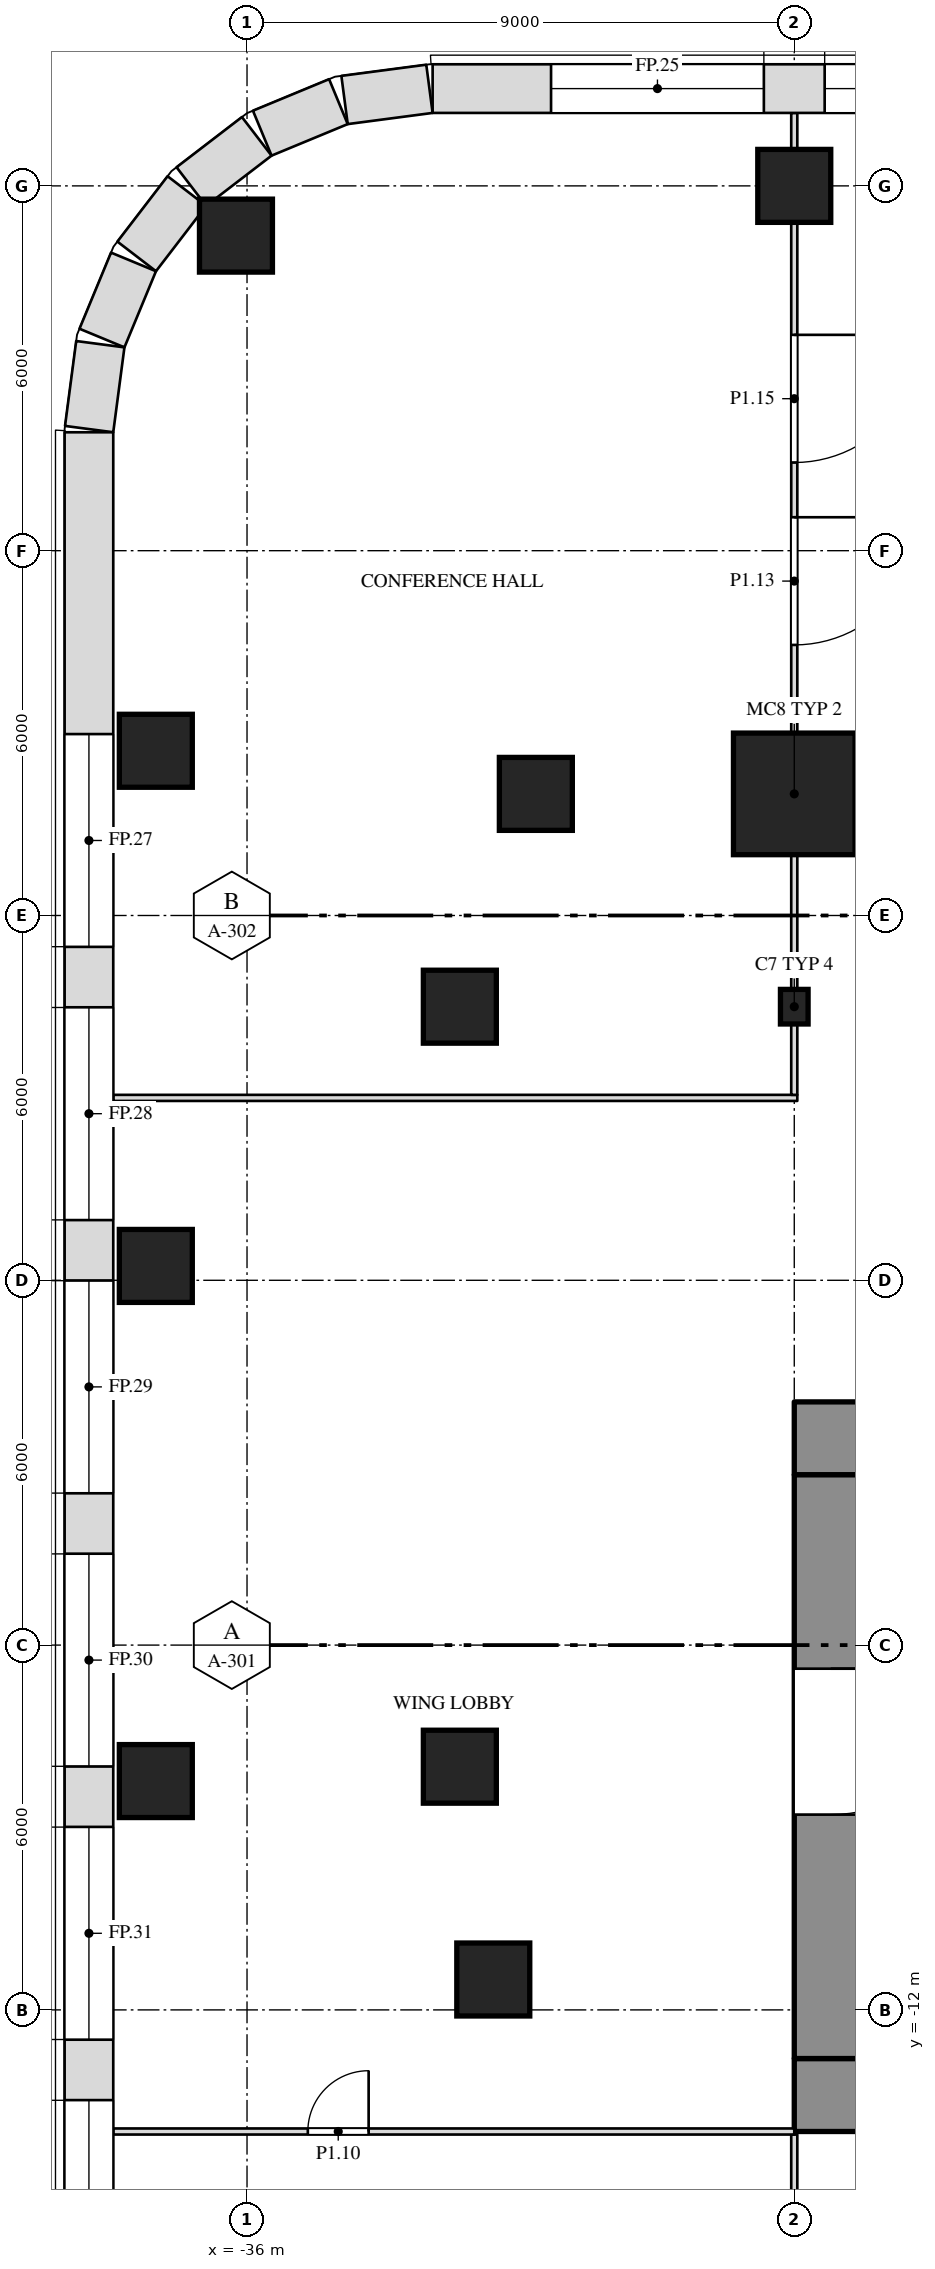
"""IFC4 building model, lengths in metres.
Left out: names, types, materials, properties, quantities, classifications, styles, units other than length and angle.
Written with IfcOpenShell. Run it as: python <this file> out.ifc"""

import sys

from ifc_helpers import new_model, si_unit, direction, frame, frame_2d, origin, origin_2d, place, context, subcontext, project, spatial, rectangle, i_section, extrude, element, fill, save


model = new_model("IFC4")
c1 = context("Model", 3, precision=1e-05, world=origin(), true_north=direction((0.0, 1.0)))
c2 = subcontext(c1, "Body", "Model", "MODEL_VIEW")
j1 = project(units=[si_unit("LENGTHUNIT", "METRE"), si_unit("PLANEANGLEUNIT", "RADIAN")], contexts=[c1])
p1 = place(None, origin())
s1 = spatial("IfcSite", under=j1, at=p1, CompositionType="ELEMENT")
p2 = place(p1, origin())
s2 = spatial("IfcBuilding", under=s1, at=p2, CompositionType="ELEMENT")
p3 = place(p2, frame((0.0, 0.0, 9.0)))
s3 = spatial("IfcBuildingStorey", under=s2, at=p3, CompositionType="ELEMENT", Elevation=9.0)
for number, where, z_axis, x_axis in (
    (1, (-31.95, -11.5, 0.0), (0.0, 0.0, 1.0), (1.0, 0.0, 0.0)),
    (2, (-37.5, -8.236, 0.0), (0.0, 0.0, 1.0), (1.0, 0.0, 0.0)),
    (3, (-32.5, -8.0, 0.0), (0.0, 0.0, 1.0), (1.0, 0.0, 0.0)),
    (4, (-37.5, 0.236, 0.0), (0.0, 0.0, 1.0), (1.0, 0.0, 0.0)),
    (5, (-32.5, 4.5, 0.0), (0.0, 0.0, 1.0), (1.0, 0.0, 0.0)),
):
    element("IfcColumn", number, at=place(p3, frame(where, z_axis=z_axis, x_axis=x_axis)), inside=s3, PredefinedType="COLUMN", context=c2, shape_type="SweptSolid", body=[
        extrude(rectangle(XDim=1.2, YDim=1.2, at=origin_2d()), origin(), (0.0, 0.0, 1.0), 6.0),
    ])
p4 = place(p3, frame((-27.0, 4.5, 0.0), z_axis=(0.0, 0.0, 1.0), x_axis=(1.0, 0.0, 0.0)))
e6 = element("IfcColumn", 6, at=p4, inside=s3, PredefinedType="COLUMN", context=c2, shape_type="SweptSolid", body=[
    extrude(i_section(OverallWidth=0.455, OverallDepth=0.569, WebThickness=0.078, FlangeThickness=0.125, at=origin_2d()), origin(), (0.0, 0.0, 1.0), 6.0),
])
p5 = place(p3, frame((-31.25, 8.0, 0.0), z_axis=(0.0, 0.0, 1.0), x_axis=(1.0, 0.0, 0.0)))
e7 = element("IfcColumn", 7, at=p5, inside=s3, PredefinedType="COLUMN", context=c2, shape_type="SweptSolid", body=[
    extrude(rectangle(XDim=1.2, YDim=1.2, at=origin_2d()), origin(), (0.0, 0.0, 1.0), 6.0),
])
p6 = place(p3, frame((-27.0, 8.0, 0.0), z_axis=(0.0, 0.0, 1.0), x_axis=(1.0, 0.0, 0.0)))
e8 = element("IfcColumn", 8, at=p6, inside=s3, PredefinedType="COLUMN", context=c2, shape_type="SweptSolid", body=[
    extrude(rectangle(XDim=2.0, YDim=2.0, at=origin_2d()), origin(), (0.0, 0.0, 1.0), 6.0),
])
for number, where, z_axis, x_axis in (
    (9, (-37.5, 8.709, 0.0), (0.0, 0.0, 1.0), (1.0, 0.0, 0.0)),
    (10, (-36.182, 17.182, 0.0), (0.0, 0.0, 1.0), (1.0, 0.0, 0.0)),
    (11, (-27.0, 18.0, 0.0), (0.0, 0.0, 1.0), (1.0, 0.0, 0.0)),
):
    element("IfcColumn", number, at=place(p3, frame(where, z_axis=z_axis, x_axis=x_axis)), inside=s3, PredefinedType="COLUMN", context=c2, shape_type="SweptSolid", body=[
        extrude(rectangle(XDim=1.2, YDim=1.2, at=origin_2d()), origin(), (0.0, 0.0, 1.0), 6.0),
    ])
p7 = place(p3, frame((-27.0, -2.6, 0.0), z_axis=(0.0, 0.0, 1.0), x_axis=(1.0, 0.0, 0.0)))
e12 = element("IfcWall", 12, at=p7, inside=s3, PredefinedType="SHEAR", context=c2, shape_type="SweptSolid", body=[
    extrude(rectangle(XDim=54.0, YDim=1.2, at=frame_2d((27.0, 0.0))), origin(), (0.0, 0.0, 1.0), 5.7),
])
p8 = place(p3, frame((-27.0, -13.4, 0.0), z_axis=(0.0, 0.0, 1.0), x_axis=(1.0, 0.0, 0.0)))
e13 = element("IfcWall", 13, at=p8, inside=s3, PredefinedType="SHEAR", context=c2, shape_type="SweptSolid", body=[
    extrude(rectangle(XDim=54.0, YDim=1.2, at=frame_2d((27.0, 0.0))), origin(), (0.0, 0.0, 1.0), 5.7),
])
p9 = place(p8, frame((16.45, 0.0, 0.0)))
e14 = element("IfcOpeningElement", 14, at=p9, cuts=e13, PredefinedType="OPENING", context=c2, shape_type="SweptSolid", body=[
    extrude(rectangle(XDim=1.0, YDim=2.1, at=frame_2d((0.5, 1.05))), frame((0.0, 0.612, 0.0), z_axis=(0.0, -1.0, 0.0), x_axis=(1.0, 0.0, 0.0)), (0.0, 0.0, 1.0), 1.224),
])
p10 = place(p8, frame((36.55, 0.0, 0.0)))
e15 = element("IfcOpeningElement", 15, at=p10, cuts=e13, PredefinedType="OPENING", context=c2, shape_type="SweptSolid", body=[
    extrude(rectangle(XDim=1.0, YDim=2.1, at=frame_2d((0.5, 1.05))), frame((0.0, 0.612, 0.0), z_axis=(0.0, -1.0, 0.0), x_axis=(1.0, 0.0, 0.0)), (0.0, 0.0, 1.0), 1.224),
])
p11 = place(p3, frame((-26.4, -12.8, 0.0), z_axis=(0.0, 0.0, 1.0), x_axis=(0.0, 1.0, 0.0)))
e16 = element("IfcWall", 16, at=p11, inside=s3, PredefinedType="SHEAR", context=c2, shape_type="SweptSolid", body=[
    extrude(rectangle(XDim=9.6, YDim=1.2, at=frame_2d((4.8, 0.0))), origin(), (0.0, 0.0, 1.0), 5.7),
])
p12 = place(p11, frame((4.012, 0.0, 0.0)))
e17 = element("IfcOpeningElement", 17, at=p12, cuts=e16, PredefinedType="OPENING", context=c2, shape_type="SweptSolid", body=[
    extrude(rectangle(XDim=2.4, YDim=2.1, at=frame_2d((1.2, 1.05))), frame((0.0, 0.612, 0.0), z_axis=(0.0, -1.0, 0.0), x_axis=(1.0, 0.0, 0.0)), (0.0, 0.0, 1.0), 1.224),
])
p13 = place(p3, frame((-27.0, -16.9, 0.0), z_axis=(0.0, 0.0, 1.0), x_axis=(0.0, 1.0, 0.0)))
e18 = element("IfcWall", 18, at=p13, inside=s3, PredefinedType="PARTITIONING", context=c2, shape_type="SweptSolid", body=[
    extrude(rectangle(XDim=2.85, YDim=0.1, at=frame_2d((1.425, 0.0))), origin(), (0.0, 0.0, 1.0), 5.088),
])
p14 = place(p3, frame((-38.2, -14.0, 0.0), z_axis=(0.0, 0.0, 1.0), x_axis=(1.0, 0.0, 0.0)))
e19 = element("IfcWall", 19, at=p14, inside=s3, PredefinedType="PARTITIONING", context=c2, shape_type="SweptSolid", body=[
    extrude(rectangle(XDim=11.2, YDim=0.1, at=frame_2d((5.6, 0.0))), origin(), (0.0, 0.0, 1.0), 5.7),
])
p15 = place(p14, frame((3.2, 0.0, 0.0)))
e20 = element("IfcOpeningElement", 20, at=p15, cuts=e19, PredefinedType="OPENING", context=c2, shape_type="SweptSolid", body=[
    extrude(rectangle(XDim=1.0, YDim=2.1, at=frame_2d((0.5, 1.05))), frame((0.0, 0.062, 0.0), z_axis=(0.0, -1.0, 0.0), x_axis=(1.0, 0.0, 0.0)), (0.0, 0.0, 1.0), 0.124),
])
p16 = place(p3, frame((-38.2, 3.0, 0.0), z_axis=(0.0, 0.0, 1.0), x_axis=(1.0, 0.0, 0.0)))
e21 = element("IfcWall", 21, at=p16, inside=s3, PredefinedType="PARTITIONING", context=c2, shape_type="SweptSolid", body=[
    extrude(rectangle(XDim=11.25, YDim=0.1, at=frame_2d((5.625, 0.0))), origin(), (0.0, 0.0, 1.0), 5.7),
])
p17 = place(p3, frame((-27.0, 3.05, 0.0), z_axis=(0.0, 0.0, 1.0), x_axis=(0.0, 1.0, 0.0)))
e22 = element("IfcWall", 22, at=p17, inside=s3, PredefinedType="PARTITIONING", context=c2, shape_type="SweptSolid", body=[
    extrude(rectangle(XDim=1.166, YDim=0.1, at=frame_2d((0.583, 0.0))), origin(), (0.0, 0.0, 1.0), 5.088),
])
p18 = place(p3, frame((-27.0, 4.784, 0.0), z_axis=(0.0, 0.0, 1.0), x_axis=(0.0, 1.0, 0.0)))
e23 = element("IfcWall", 23, at=p18, inside=s3, PredefinedType="PARTITIONING", context=c2, shape_type="SweptSolid", body=[
    extrude(rectangle(XDim=2.216, YDim=0.1, at=frame_2d((1.108, 0.0))), origin(), (0.0, 0.0, 1.0), 5.088),
])
p19 = place(p3, frame((-27.0, 9.0, 0.0), z_axis=(0.0, 0.0, 1.0), x_axis=(0.0, 1.0, 0.0)))
e24 = element("IfcWall", 24, at=p19, inside=s3, PredefinedType="PARTITIONING", context=c2, shape_type="SweptSolid", body=[
    extrude(rectangle(XDim=8.4, YDim=0.1, at=frame_2d((4.2, 0.0))), origin(), (0.0, 0.0, 1.0), 5.088),
])
p20 = place(p19, frame((1.45, 0.0, 0.0)))
e25 = element("IfcOpeningElement", 25, at=p20, cuts=e24, PredefinedType="OPENING", context=c2, shape_type="SweptSolid", body=[
    extrude(rectangle(XDim=2.1, YDim=2.4, at=frame_2d((1.05, 1.2))), frame((0.0, 0.062, 0.0), z_axis=(0.0, -1.0, 0.0), x_axis=(1.0, 0.0, 0.0)), (0.0, 0.0, 1.0), 0.124),
])
p21 = place(p19, frame((4.45, 0.0, 0.0)))
e26 = element("IfcOpeningElement", 26, at=p21, cuts=e24, PredefinedType="OPENING", context=c2, shape_type="SweptSolid", body=[
    extrude(rectangle(XDim=2.1, YDim=2.4, at=frame_2d((1.05, 1.2))), frame((0.0, 0.062, 0.0), z_axis=(0.0, -1.0, 0.0), x_axis=(1.0, 0.0, 0.0)), (0.0, 0.0, 1.0), 0.124),
])
p22 = place(p3, frame((-27.0, 18.6, 0.0), z_axis=(0.0, 0.0, 1.0), x_axis=(0.0, 1.0, 0.0)))
e27 = element("IfcWall", 27, at=p22, inside=s3, PredefinedType="PARTITIONING", context=c2, shape_type="SweptSolid", body=[
    extrude(rectangle(XDim=0.6, YDim=0.1, at=frame_2d((0.3, 0.0))), origin(), (0.0, 0.0, 1.0), 5.7),
])
p23 = place(p3, frame((-18.0, 19.6, 0.0), z_axis=(0.0, 0.0, 1.0), x_axis=(-1.0, 0.0, 0.0)))
e28 = element("IfcWall", 28, at=p23, inside=s3, PredefinedType="SOLIDWALL", context=c2, shape_type="SweptSolid", body=[
    extrude(rectangle(XDim=14.948, YDim=0.8, at=frame_2d((7.474, 0.0))), origin(), (0.0, 0.0, 1.0), 5.7),
])
p24 = place(p23, frame((0.5, 0.0, 1.0)))
e29 = element("IfcOpeningElement", 29, at=p24, cuts=e28, PredefinedType="OPENING", context=c2, shape_type="SweptSolid", body=[
    extrude(rectangle(XDim=3.5, YDim=4.0, at=frame_2d((1.75, 2.0))), frame((0.0, 0.412, 0.0), z_axis=(0.0, -1.0, 0.0), x_axis=(1.0, 0.0, 0.0)), (0.0, 0.0, 1.0), 0.824),
])
p25 = place(p23, frame((5.0, 0.0, 1.0)))
e30 = element("IfcOpeningElement", 30, at=p25, cuts=e28, PredefinedType="OPENING", context=c2, shape_type="SweptSolid", body=[
    extrude(rectangle(XDim=3.5, YDim=4.0, at=frame_2d((1.75, 2.0))), frame((0.0, 0.412, 0.0), z_axis=(0.0, -1.0, 0.0), x_axis=(1.0, 0.0, 0.0)), (0.0, 0.0, 1.0), 0.824),
])
p26 = place(p23, frame((9.5, 0.0, 1.0)))
e31 = element("IfcOpeningElement", 31, at=p26, cuts=e28, PredefinedType="OPENING", context=c2, shape_type="SweptSolid", body=[
    extrude(rectangle(XDim=3.5, YDim=4.0, at=frame_2d((1.75, 2.0))), frame((0.0, 0.412, 0.0), z_axis=(0.0, -1.0, 0.0), x_axis=(1.0, 0.0, 0.0)), (0.0, 0.0, 1.0), 0.824),
])
p27 = place(p3, frame((-33.0, 19.597, 0.0), z_axis=(0.0, 0.0, 1.0), x_axis=(-0.99144603414, -0.130517283865, 0.0)))
e32 = element("IfcWall", 32, at=p27, inside=s3, PredefinedType="SOLIDWALL", context=c2, shape_type="SweptSolid", body=[
    extrude(rectangle(XDim=1.408, YDim=0.8, at=frame_2d((0.704, 0.0))), origin(), (0.0, 0.0, 1.0), 5.7),
])
p28 = place(p3, frame((-34.497, 19.386, 0.0), z_axis=(0.0, 0.0, 1.0), x_axis=(-0.923847774587, -0.38276009378, 0.0)))
e33 = element("IfcWall", 33, at=p28, inside=s3, PredefinedType="SOLIDWALL", context=c2, shape_type="SweptSolid", body=[
    extrude(rectangle(XDim=1.355, YDim=0.8, at=frame_2d((0.678, 0.0))), origin(), (0.0, 0.0, 1.0), 5.7),
])
for number, where, z_axis, x_axis in (
    (34, (-35.84, 18.815, 0.0), (0.0, 0.0, 1.0), (-0.793, -0.609, 0.0)),
    (35, (-36.989, 17.916, 0.0), (0.0, 0.0, 1.0), (-0.609, -0.793, 0.0)),
):
    element("IfcWall", number, at=place(p3, frame(where, z_axis=z_axis, x_axis=x_axis)), inside=s3, PredefinedType="SOLIDWALL", context=c2, shape_type="SweptSolid", body=[
        extrude(rectangle(XDim=1.356, YDim=0.8, at=frame_2d((0.678, 0.0))), origin(), (0.0, 0.0, 1.0), 5.7),
    ])
p29 = place(p3, frame((-37.867, 16.75, 0.0), z_axis=(0.0, 0.0, 1.0), x_axis=(-0.38276009378, -0.923847774587, 0.0)))
e36 = element("IfcWall", 36, at=p29, inside=s3, PredefinedType="SOLIDWALL", context=c2, shape_type="SweptSolid", body=[
    extrude(rectangle(XDim=1.355, YDim=0.8, at=frame_2d((0.678, 0.0))), origin(), (0.0, 0.0, 1.0), 5.7),
])
p30 = place(p3, frame((-38.413, 15.396, 0.0), z_axis=(0.0, 0.0, 1.0), x_axis=(-0.130517283865, -0.99144603414, 0.0)))
e37 = element("IfcWall", 37, at=p30, inside=s3, PredefinedType="SOLIDWALL", context=c2, shape_type="SweptSolid", body=[
    extrude(rectangle(XDim=1.408, YDim=0.8, at=frame_2d((0.704, 0.0))), origin(), (0.0, 0.0, 1.0), 5.7),
])
p31 = place(p3, frame((-38.6, 13.948, 0.0), z_axis=(0.0, 0.0, 1.0), x_axis=(0.0, -1.0, 0.0)))
e38 = element("IfcWall", 38, at=p31, inside=s3, PredefinedType="SOLIDWALL", context=c2, shape_type="SweptSolid", body=[
    extrude(rectangle(XDim=35.895, YDim=0.8, at=frame_2d((17.948, 0.0))), origin(), (0.0, 0.0, 1.0), 5.7),
])
p32 = place(p31, frame((4.964, 0.0, 1.0)))
e39 = element("IfcOpeningElement", 39, at=p32, cuts=e38, PredefinedType="OPENING", context=c2, shape_type="SweptSolid", body=[
    extrude(rectangle(XDim=3.5, YDim=4.0, at=frame_2d((1.75, 2.0))), frame((0.0, 0.412, 0.0), z_axis=(0.0, -1.0, 0.0), x_axis=(1.0, 0.0, 0.0)), (0.0, 0.0, 1.0), 0.824),
])
p33 = place(p31, frame((9.458, 0.0, 1.0)))
e40 = element("IfcOpeningElement", 40, at=p33, cuts=e38, PredefinedType="OPENING", context=c2, shape_type="SweptSolid", body=[
    extrude(rectangle(XDim=3.5, YDim=4.0, at=frame_2d((1.75, 2.0))), frame((0.0, 0.412, 0.0), z_axis=(0.0, -1.0, 0.0), x_axis=(1.0, 0.0, 0.0)), (0.0, 0.0, 1.0), 0.824),
])
p34 = place(p31, frame((13.951, 0.0, 1.0)))
e41 = element("IfcOpeningElement", 41, at=p34, cuts=e38, PredefinedType="OPENING", context=c2, shape_type="SweptSolid", body=[
    extrude(rectangle(XDim=3.5, YDim=4.0, at=frame_2d((1.75, 2.0))), frame((0.0, 0.412, 0.0), z_axis=(0.0, -1.0, 0.0), x_axis=(1.0, 0.0, 0.0)), (0.0, 0.0, 1.0), 0.824),
])
p35 = place(p31, frame((18.444, 0.0, 1.0)))
e42 = element("IfcOpeningElement", 42, at=p35, cuts=e38, PredefinedType="OPENING", context=c2, shape_type="SweptSolid", body=[
    extrude(rectangle(XDim=3.5, YDim=4.0, at=frame_2d((1.75, 2.0))), frame((0.0, 0.412, 0.0), z_axis=(0.0, -1.0, 0.0), x_axis=(1.0, 0.0, 0.0)), (0.0, 0.0, 1.0), 0.824),
])
p36 = place(p31, frame((22.938, 0.0, 1.0)))
e43 = element("IfcOpeningElement", 43, at=p36, cuts=e38, PredefinedType="OPENING", context=c2, shape_type="SweptSolid", body=[
    extrude(rectangle(XDim=3.5, YDim=4.0, at=frame_2d((1.75, 2.0))), frame((0.0, 0.412, 0.0), z_axis=(0.0, -1.0, 0.0), x_axis=(1.0, 0.0, 0.0)), (0.0, 0.0, 1.0), 0.824),
])
p37 = place(p31, frame((27.431, 0.0, 1.0)))
e44 = element("IfcOpeningElement", 44, at=p37, cuts=e38, PredefinedType="OPENING", context=c2, shape_type="SweptSolid", body=[
    extrude(rectangle(XDim=3.5, YDim=4.0, at=frame_2d((1.75, 2.0))), frame((0.0, 0.412, 0.0), z_axis=(0.0, -1.0, 0.0), x_axis=(1.0, 0.0, 0.0)), (0.0, 0.0, 1.0), 0.824),
])
p38 = place(p15, origin())
e45 = element("IfcDoor", 45, at=p38, inside=s3, OperationType="SINGLE_SWING_RIGHT", PredefinedType="DOOR", context=c2, shape_type="SweptSolid", body=[
    extrude(rectangle(XDim=1.0, YDim=2.1, at=frame_2d((0.5, 1.05))), frame((0.0, 0.025, 0.0), z_axis=(0.0, -1.0, 0.0), x_axis=(1.0, 0.0, 0.0)), (0.0, 0.0, 1.0), 0.05),
])
fill(e20, e45)
p39 = place(p20, origin())
e46 = element("IfcDoor", 46, at=p39, inside=s3, OperationType="DOUBLE_DOOR_SINGLE_SWING", PredefinedType="DOOR", context=c2, shape_type="SweptSolid", body=[
    extrude(rectangle(XDim=2.1, YDim=2.4, at=frame_2d((1.05, 1.2))), frame((0.0, 0.025, 0.0), z_axis=(0.0, -1.0, 0.0), x_axis=(1.0, 0.0, 0.0)), (0.0, 0.0, 1.0), 0.05),
])
fill(e25, e46)
p40 = place(p21, origin())
e47 = element("IfcDoor", 47, at=p40, inside=s3, OperationType="DOUBLE_DOOR_SINGLE_SWING", PredefinedType="DOOR", context=c2, shape_type="SweptSolid", body=[
    extrude(rectangle(XDim=2.1, YDim=2.4, at=frame_2d((1.05, 1.2))), frame((0.0, 0.025, 0.0), z_axis=(0.0, -1.0, 0.0), x_axis=(1.0, 0.0, 0.0)), (0.0, 0.0, 1.0), 0.05),
])
fill(e26, e47)
p41 = place(p25, origin())
e48 = element("IfcWindow", 48, at=p41, inside=s3, PartitioningType="SINGLE_PANEL", PredefinedType="WINDOW", context=c2, shape_type="SweptSolid", body=[
    extrude(rectangle(XDim=3.5, YDim=4.0, at=frame_2d((1.75, 2.0))), frame((0.0, 0.03, 0.0), z_axis=(0.0, -1.0, 0.0), x_axis=(1.0, 0.0, 0.0)), (0.0, 0.0, 1.0), 0.06),
])
fill(e30, e48)
p42 = place(p26, origin())
e49 = element("IfcWindow", 49, at=p42, inside=s3, PartitioningType="SINGLE_PANEL", PredefinedType="WINDOW", context=c2, shape_type="SweptSolid", body=[
    extrude(rectangle(XDim=3.5, YDim=4.0, at=frame_2d((1.75, 2.0))), frame((0.0, 0.03, 0.0), z_axis=(0.0, -1.0, 0.0), x_axis=(1.0, 0.0, 0.0)), (0.0, 0.0, 1.0), 0.06),
])
fill(e31, e49)
p43 = place(p32, origin())
e50 = element("IfcWindow", 50, at=p43, inside=s3, PartitioningType="SINGLE_PANEL", PredefinedType="WINDOW", context=c2, shape_type="SweptSolid", body=[
    extrude(rectangle(XDim=3.5, YDim=4.0, at=frame_2d((1.75, 2.0))), frame((0.0, 0.03, 0.0), z_axis=(0.0, -1.0, 0.0), x_axis=(1.0, 0.0, 0.0)), (0.0, 0.0, 1.0), 0.06),
])
fill(e39, e50)
p44 = place(p33, origin())
e51 = element("IfcWindow", 51, at=p44, inside=s3, PartitioningType="SINGLE_PANEL", PredefinedType="WINDOW", context=c2, shape_type="SweptSolid", body=[
    extrude(rectangle(XDim=3.5, YDim=4.0, at=frame_2d((1.75, 2.0))), frame((0.0, 0.03, 0.0), z_axis=(0.0, -1.0, 0.0), x_axis=(1.0, 0.0, 0.0)), (0.0, 0.0, 1.0), 0.06),
])
fill(e40, e51)
p45 = place(p34, origin())
e52 = element("IfcWindow", 52, at=p45, inside=s3, PartitioningType="SINGLE_PANEL", PredefinedType="WINDOW", context=c2, shape_type="SweptSolid", body=[
    extrude(rectangle(XDim=3.5, YDim=4.0, at=frame_2d((1.75, 2.0))), frame((0.0, 0.03, 0.0), z_axis=(0.0, -1.0, 0.0), x_axis=(1.0, 0.0, 0.0)), (0.0, 0.0, 1.0), 0.06),
])
fill(e41, e52)
p46 = place(p35, origin())
e53 = element("IfcWindow", 53, at=p46, inside=s3, PartitioningType="SINGLE_PANEL", PredefinedType="WINDOW", context=c2, shape_type="SweptSolid", body=[
    extrude(rectangle(XDim=3.5, YDim=4.0, at=frame_2d((1.75, 2.0))), frame((0.0, 0.03, 0.0), z_axis=(0.0, -1.0, 0.0), x_axis=(1.0, 0.0, 0.0)), (0.0, 0.0, 1.0), 0.06),
])
fill(e42, e53)
p47 = place(p36, origin())
e54 = element("IfcWindow", 54, at=p47, inside=s3, PartitioningType="SINGLE_PANEL", PredefinedType="WINDOW", context=c2, shape_type="SweptSolid", body=[
    extrude(rectangle(XDim=3.5, YDim=4.0, at=frame_2d((1.75, 2.0))), frame((0.0, 0.03, 0.0), z_axis=(0.0, -1.0, 0.0), x_axis=(1.0, 0.0, 0.0)), (0.0, 0.0, 1.0), 0.06),
])
fill(e43, e54)
p48 = place(p37, origin())
e55 = element("IfcWindow", 55, at=p48, inside=s3, PartitioningType="SINGLE_PANEL", PredefinedType="WINDOW", context=c2, shape_type="SweptSolid", body=[
    extrude(rectangle(XDim=3.5, YDim=4.0, at=frame_2d((1.75, 2.0))), frame((0.0, 0.03, 0.0), z_axis=(0.0, -1.0, 0.0), x_axis=(1.0, 0.0, 0.0)), (0.0, 0.0, 1.0), 0.06),
])
fill(e44, e55)
p49 = place(p12, origin())
e56 = element("IfcDoor", 56, at=p49, inside=s3, OperationType="DOUBLE_DOOR_SINGLE_SWING", PredefinedType="DOOR", context=c2, shape_type="SweptSolid", body=[
    extrude(rectangle(XDim=2.4, YDim=2.1, at=frame_2d((1.2, 1.05))), frame((0.0, 0.025, 0.0), z_axis=(0.0, -1.0, 0.0), x_axis=(1.0, 0.0, 0.0)), (0.0, 0.0, 1.0), 0.05),
])
fill(e17, e56)
save(model, sys.argv[1])
